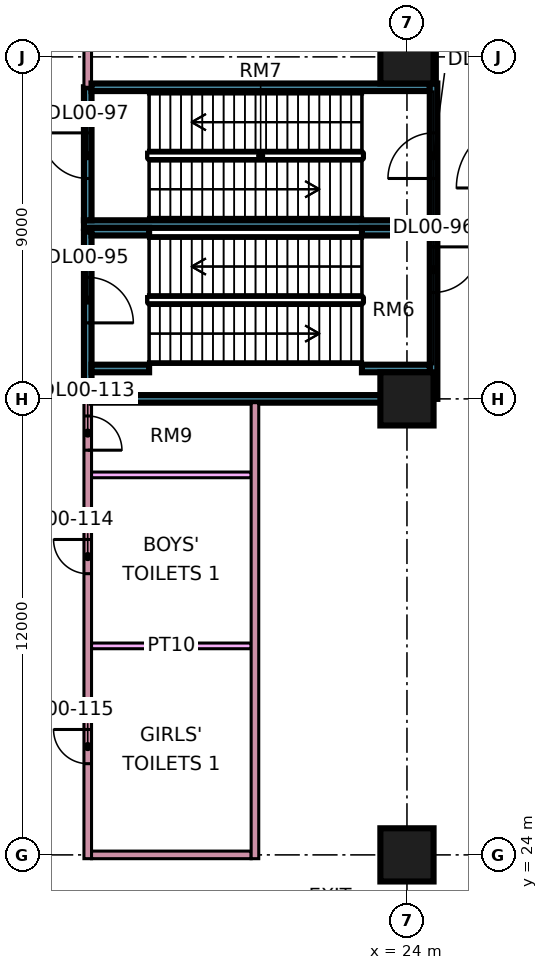
"""IFC4 building model, lengths in metres.
Left out: names, types, materials, properties, quantities, classifications, styles, units other than length and angle.
Written with IfcOpenShell. Run it as: python <this file> out.ifc"""

import sys

from ifc_helpers import new_model, si_unit, direction, frame, frame_2d, origin, origin_2d, place, context, subcontext, project, spatial, rectangle, extrude, element, fill, save


model = new_model("IFC4")
c1 = context("Model", 3, precision=1e-05, world=origin(), true_north=direction((0.0, 1.0)))
c2 = subcontext(c1, "Body", "Model", "MODEL_VIEW")
j1 = project(units=[si_unit("LENGTHUNIT", "METRE"), si_unit("PLANEANGLEUNIT", "RADIAN")], contexts=[c1])
p1 = place(None, origin())
s1 = spatial("IfcSite", under=j1, at=p1, CompositionType="ELEMENT")
p2 = place(p1, origin())
s2 = spatial("IfcBuilding", under=s1, at=p2, CompositionType="ELEMENT")
p3 = place(p2, origin())
s3 = spatial("IfcBuildingStorey", under=s2, at=p3, CompositionType="ELEMENT", Elevation=0.0)
for number, where, z_axis, x_axis in (
    (1, (24.0, 24.0, 0.0), (0.0, 0.0, 1.0), (1.0, 0.0, 0.0)),
    (2, (24.0, 36.0, 0.0), (0.0, 0.0, 1.0), (1.0, 0.0, 0.0)),
    (3, (24.0, 45.0, 0.0), (0.0, 0.0, 1.0), (1.0, 0.0, 0.0)),
):
    element("IfcColumn", number, at=place(p3, frame(where, z_axis=z_axis, x_axis=x_axis)), inside=s3, PredefinedType="COLUMN", context=c2, shape_type="SweptSolid", body=[
        extrude(rectangle(XDim=1.4, YDim=1.4, at=origin_2d()), origin(), (0.0, 0.0, 1.0), 7.2),
    ])
p4 = place(p3, frame((15.5, 40.6, 0.0), z_axis=(0.0, 0.0, 1.0), x_axis=(1.0, 0.0, 0.0)))
e4 = element("IfcWall", 4, at=p4, inside=s3, PredefinedType="SOLIDWALL", context=c2, shape_type="SweptSolid", body=[
    extrude(rectangle(XDim=9.3, YDim=0.2, at=frame_2d((4.65, 0.0))), origin(), (0.0, 0.0, 1.0), 6.8),
])
p5 = place(p3, frame((15.6, 23.9, 0.0), z_axis=(0.0, 0.0, 1.0), x_axis=(0.0, 1.0, 0.0)))
e5 = element("IfcWall", 5, at=p5, inside=s3, PredefinedType="PARTITIONING", context=c2, shape_type="SweptSolid", body=[
    extrude(rectangle(XDim=12.1, YDim=0.2, at=frame_2d((6.05, 0.0))), origin(), (0.0, 0.0, 1.0), 6.8),
])
p6 = place(p5, frame((10.75, 0.0, 0.0)))
e6 = element("IfcOpeningElement", 6, at=p6, cuts=e5, PredefinedType="OPENING", context=c2, shape_type="SweptSolid", body=[
    extrude(rectangle(XDim=0.9, YDim=2.1, at=frame_2d((0.45, 1.05))), frame((0.0, 0.11, 0.0), z_axis=(0.0, -1.0, 0.0), x_axis=(1.0, 0.0, 0.0)), (0.0, 0.0, 1.0), 0.22),
])
p7 = place(p5, frame((7.5, 0.0, 0.0)))
e7 = element("IfcOpeningElement", 7, at=p7, cuts=e5, PredefinedType="OPENING", context=c2, shape_type="SweptSolid", body=[
    extrude(rectangle(XDim=0.9, YDim=2.1, at=frame_2d((0.45, 1.05))), frame((0.0, 0.11, 0.0), z_axis=(0.0, -1.0, 0.0), x_axis=(1.0, 0.0, 0.0)), (0.0, 0.0, 1.0), 0.22),
])
p8 = place(p5, frame((2.5, 0.0, 0.0)))
e8 = element("IfcOpeningElement", 8, at=p8, cuts=e5, PredefinedType="OPENING", context=c2, shape_type="SweptSolid", body=[
    extrude(rectangle(XDim=0.9, YDim=2.1, at=frame_2d((0.45, 1.05))), frame((0.0, 0.11, 0.0), z_axis=(0.0, -1.0, 0.0), x_axis=(1.0, 0.0, 0.0)), (0.0, 0.0, 1.0), 0.22),
])
p9 = place(p3, frame((15.6, 36.0, 0.0), z_axis=(0.0, 0.0, 1.0), x_axis=(0.0, 1.0, 0.0)))
e9 = element("IfcWall", 9, at=p9, inside=s3, PredefinedType="SOLIDWALL", context=c2, shape_type="SweptSolid", body=[
    extrude(rectangle(XDim=4.4, YDim=0.2, at=frame_2d((2.2, 0.0))), origin(), (0.0, 0.0, 1.0), 6.8),
])
p10 = place(p9, frame((2.0, 0.0, 0.0)))
e10 = element("IfcOpeningElement", 10, at=p10, cuts=e9, PredefinedType="OPENING", context=c2, shape_type="SweptSolid", body=[
    extrude(rectangle(XDim=1.2, YDim=2.1, at=frame_2d((0.6, 1.05))), frame((0.0, 0.11, 0.0), z_axis=(0.0, -1.0, 0.0), x_axis=(1.0, 0.0, 0.0)), (0.0, 0.0, 1.0), 0.22),
])
p11 = place(p3, frame((15.6, 40.7, 0.0), z_axis=(0.0, 0.0, 1.0), x_axis=(0.0, 1.0, 0.0)))
e11 = element("IfcWall", 11, at=p11, inside=s3, PredefinedType="SOLIDWALL", context=c2, shape_type="SweptSolid", body=[
    extrude(rectangle(XDim=3.5, YDim=0.2, at=frame_2d((1.75, 0.0))), origin(), (0.0, 0.0, 1.0), 6.8),
])
p12 = place(p11, frame((1.1, 0.0, 0.0)))
e12 = element("IfcOpeningElement", 12, at=p12, cuts=e11, PredefinedType="OPENING", context=c2, shape_type="SweptSolid", body=[
    extrude(rectangle(XDim=1.2, YDim=2.1, at=frame_2d((0.6, 1.05))), frame((0.0, 0.11, 0.0), z_axis=(0.0, -1.0, 0.0), x_axis=(1.0, 0.0, 0.0)), (0.0, 0.0, 1.0), 0.22),
])
p13 = place(p3, frame((15.6, 44.2, 0.0), z_axis=(0.0, 0.0, 1.0), x_axis=(0.0, 1.0, 0.0)))
e13 = element("IfcWall", 13, at=p13, inside=s3, PredefinedType="PARTITIONING", context=c2, shape_type="SweptSolid", body=[
    extrude(rectangle(XDim=3.575, YDim=0.2, at=frame_2d((1.788, 0.0))), origin(), (0.0, 0.0, 1.0), 6.8),
])
p14 = place(p3, frame((15.7, 24.0, 0.0), z_axis=(0.0, 0.0, 1.0), x_axis=(1.0, 0.0, 0.0)))
e14 = element("IfcWall", 14, at=p14, inside=s3, PredefinedType="PARTITIONING", context=c2, shape_type="SweptSolid", body=[
    extrude(rectangle(XDim=4.2, YDim=0.2, at=frame_2d((2.1, 0.0))), origin(), (0.0, 0.0, 1.0), 6.8),
])
for number, where, z_axis, x_axis in (
    (15, (15.7, 29.5, 0.0), (0.0, 0.0, 1.0), (1.0, 0.0, 0.0)),
    (16, (15.7, 34.0, 0.0), (0.0, 0.0, 1.0), (1.0, 0.0, 0.0)),
):
    element("IfcWall", number, at=place(p3, frame(where, z_axis=z_axis, x_axis=x_axis)), inside=s3, PredefinedType="PARTITIONING", context=c2, shape_type="SweptSolid", body=[
        extrude(rectangle(XDim=4.2, YDim=0.15, at=frame_2d((2.1, 0.0))), origin(), (0.0, 0.0, 1.0), 6.8),
    ])
p15 = place(p3, frame((15.7, 36.0, 0.0), z_axis=(0.0, 0.0, 1.0), x_axis=(1.0, 0.0, 0.0)))
e17 = element("IfcWall", 17, at=p15, inside=s3, PredefinedType="SOLIDWALL", context=c2, shape_type="SweptSolid", body=[
    extrude(rectangle(XDim=8.3, YDim=0.2, at=frame_2d((4.15, 0.0))), origin(), (0.0, 0.0, 1.0), 6.8),
])
p16 = place(p3, frame((15.7, 44.2, 0.0), z_axis=(0.0, 0.0, 1.0), x_axis=(1.0, 0.0, 0.0)))
e18 = element("IfcWall", 18, at=p16, inside=s3, PredefinedType="SOLIDWALL", context=c2, shape_type="SweptSolid", body=[
    extrude(rectangle(XDim=8.9, YDim=0.2, at=frame_2d((4.45, 0.0))), origin(), (0.0, 0.0, 1.0), 6.8),
])
p17 = place(p3, frame((20.0, 23.9, 0.0), z_axis=(0.0, 0.0, 1.0), x_axis=(0.0, 1.0, 0.0)))
e19 = element("IfcWall", 19, at=p17, inside=s3, PredefinedType="PARTITIONING", context=c2, shape_type="SweptSolid", body=[
    extrude(rectangle(XDim=12.0, YDim=0.2, at=frame_2d((6.0, 0.0))), origin(), (0.0, 0.0, 1.0), 6.8),
])
p18 = place(p3, frame((24.7, 36.0, 0.0), z_axis=(0.0, 0.0, 1.0), x_axis=(0.0, 1.0, 0.0)))
e20 = element("IfcWall", 20, at=p18, inside=s3, PredefinedType="SOLIDWALL", context=c2, shape_type="SweptSolid", body=[
    extrude(rectangle(XDim=4.4, YDim=0.2, at=frame_2d((2.2, 0.0))), origin(), (0.0, 0.0, 1.0), 6.8),
])
p19 = place(p18, frame((2.8, 0.0, 0.0)))
e21 = element("IfcOpeningElement", 21, at=p19, cuts=e20, PredefinedType="OPENING", context=c2, shape_type="SweptSolid", body=[
    extrude(rectangle(XDim=1.2, YDim=2.1, at=frame_2d((0.6, 1.05))), frame((0.0, 0.11, 0.0), z_axis=(0.0, -1.0, 0.0), x_axis=(1.0, 0.0, 0.0)), (0.0, 0.0, 1.0), 0.22),
])
p20 = place(p3, frame((24.7, 40.7, 0.0), z_axis=(0.0, 0.0, 1.0), x_axis=(0.0, 1.0, 0.0)))
e22 = element("IfcWall", 22, at=p20, inside=s3, PredefinedType="SOLIDWALL", context=c2, shape_type="SweptSolid", body=[
    extrude(rectangle(XDim=3.6, YDim=0.2, at=frame_2d((1.8, 0.0))), origin(), (0.0, 0.0, 1.0), 6.8),
])
p21 = place(p20, frame((1.1, 0.0, 0.0)))
e23 = element("IfcOpeningElement", 23, at=p21, cuts=e22, PredefinedType="OPENING", context=c2, shape_type="SweptSolid", body=[
    extrude(rectangle(XDim=1.2, YDim=2.1, at=frame_2d((0.6, 1.05))), frame((0.0, 0.11, 0.0), z_axis=(0.0, -1.0, 0.0), x_axis=(1.0, 0.0, 0.0)), (0.0, 0.0, 1.0), 0.22),
])
p22 = place(p3, frame((24.7, 44.3, 0.0), z_axis=(0.0, 0.0, 1.0), x_axis=(0.0, 1.0, 0.0)))
e24 = element("IfcWall", 24, at=p22, inside=s3, PredefinedType="PARTITIONING", context=c2, shape_type="SweptSolid", body=[
    extrude(rectangle(XDim=19.5, YDim=0.2, at=frame_2d((9.75, 0.0))), origin(), (0.0, 0.0, 1.0), 6.8),
])
p23 = place(p22, frame((1.45, 0.0, 0.0)))
e25 = element("IfcOpeningElement", 25, at=p23, cuts=e24, PredefinedType="OPENING", context=c2, shape_type="SweptSolid", body=[
    extrude(rectangle(XDim=1.0, YDim=2.1, at=frame_2d((0.5, 1.05))), frame((0.0, 0.11, 0.0), z_axis=(0.0, -1.0, 0.0), x_axis=(1.0, 0.0, 0.0)), (0.0, 0.0, 1.0), 0.22),
])
p24 = place(p22, frame((6.65, 0.0, 0.0)))
e26 = element("IfcOpeningElement", 26, at=p24, cuts=e24, PredefinedType="OPENING", context=c2, shape_type="SweptSolid", body=[
    extrude(rectangle(XDim=1.0, YDim=2.1, at=frame_2d((0.5, 1.05))), frame((0.0, 0.11, 0.0), z_axis=(0.0, -1.0, 0.0), x_axis=(1.0, 0.0, 0.0)), (0.0, 0.0, 1.0), 0.22),
])
for number, where, z_axis, x_axis in (
    (27, (22.815, 36.8, 0.0), (0.0, 0.0, 1.0), (1.0, 0.0, 0.0)),
    (28, (22.815, 40.4, 0.0), (0.0, 0.0, 1.0), (1.0, 0.0, 0.0)),
):
    element("IfcWall", number, at=place(p3, frame(where, z_axis=z_axis, x_axis=x_axis)), inside=s3, PredefinedType="SOLIDWALL", context=c2, shape_type="SweptSolid", body=[
        extrude(rectangle(XDim=1.785, YDim=0.2, at=frame_2d((0.893, 0.0))), origin(), (0.0, 0.0, 1.0), 6.8),
    ])
for number, where, z_axis, x_axis in (
    (29, (15.7, 36.8, 0.0), (0.0, 0.0, 1.0), (1.0, 0.0, 0.0)),
    (30, (15.7, 40.4, 0.0), (0.0, 0.0, 1.0), (1.0, 0.0, 0.0)),
):
    element("IfcWall", number, at=place(p3, frame(where, z_axis=z_axis, x_axis=x_axis)), inside=s3, PredefinedType="SOLIDWALL", context=c2, shape_type="SweptSolid", body=[
        extrude(rectangle(XDim=1.515, YDim=0.2, at=frame_2d((0.758, 0.0))), origin(), (0.0, 0.0, 1.0), 6.8),
    ])
p25 = place(p10, frame((1.2, 0.0, 0.0), z_axis=(0.0, 0.0, 1.0), x_axis=(-1.0, 0.0, 0.0)))
e31 = element("IfcDoor", 31, at=p25, inside=s3, OperationType="SINGLE_SWING_LEFT", PredefinedType="DOOR", context=c2, shape_type="SweptSolid", body=[
    extrude(rectangle(XDim=1.2, YDim=2.1, at=frame_2d((0.6, 1.05))), frame((0.0, 0.025, 0.0), z_axis=(0.0, -1.0, 0.0), x_axis=(1.0, 0.0, 0.0)), (0.0, 0.0, 1.0), 0.05),
])
fill(e10, e31)
p26 = place(p19, origin())
e32 = element("IfcDoor", 32, at=p26, inside=s3, OperationType="SINGLE_SWING_RIGHT", PredefinedType="DOOR", context=c2, shape_type="SweptSolid", body=[
    extrude(rectangle(XDim=1.2, YDim=2.1, at=frame_2d((0.6, 1.05))), frame((0.0, 0.025, 0.0), z_axis=(0.0, -1.0, 0.0), x_axis=(1.0, 0.0, 0.0)), (0.0, 0.0, 1.0), 0.05),
])
fill(e21, e32)
p27 = place(p12, frame((1.2, 0.0, 0.0), z_axis=(0.0, 0.0, 1.0), x_axis=(-1.0, 0.0, 0.0)))
e33 = element("IfcDoor", 33, at=p27, inside=s3, OperationType="SINGLE_SWING_RIGHT", PredefinedType="DOOR", context=c2, shape_type="SweptSolid", body=[
    extrude(rectangle(XDim=1.2, YDim=2.1, at=frame_2d((0.6, 1.05))), frame((0.0, 0.025, 0.0), z_axis=(0.0, -1.0, 0.0), x_axis=(1.0, 0.0, 0.0)), (0.0, 0.0, 1.0), 0.05),
])
fill(e12, e33)
p28 = place(p21, origin())
e34 = element("IfcDoor", 34, at=p28, inside=s3, OperationType="SINGLE_SWING_LEFT", PredefinedType="DOOR", context=c2, shape_type="SweptSolid", body=[
    extrude(rectangle(XDim=1.2, YDim=2.1, at=frame_2d((0.6, 1.05))), frame((0.0, 0.025, 0.0), z_axis=(0.0, -1.0, 0.0), x_axis=(1.0, 0.0, 0.0)), (0.0, 0.0, 1.0), 0.05),
])
fill(e23, e34)
p29 = place(p6, frame((0.9, 0.0, 0.0), z_axis=(0.0, 0.0, 1.0), x_axis=(-1.0, 0.0, 0.0)))
e35 = element("IfcDoor", 35, at=p29, inside=s3, OperationType="SINGLE_SWING_LEFT", PredefinedType="DOOR", context=c2, shape_type="SweptSolid", body=[
    extrude(rectangle(XDim=0.9, YDim=2.1, at=frame_2d((0.45, 1.05))), frame((0.0, 0.025, 0.0), z_axis=(0.0, -1.0, 0.0), x_axis=(1.0, 0.0, 0.0)), (0.0, 0.0, 1.0), 0.05),
])
fill(e6, e35)
p30 = place(p7, frame((0.9, 0.0, 0.0), z_axis=(0.0, 0.0, 1.0), x_axis=(-1.0, 0.0, 0.0)))
e36 = element("IfcDoor", 36, at=p30, inside=s3, OperationType="SINGLE_SWING_RIGHT", PredefinedType="DOOR", context=c2, shape_type="SweptSolid", body=[
    extrude(rectangle(XDim=0.9, YDim=2.1, at=frame_2d((0.45, 1.05))), frame((0.0, 0.025, 0.0), z_axis=(0.0, -1.0, 0.0), x_axis=(1.0, 0.0, 0.0)), (0.0, 0.0, 1.0), 0.05),
])
fill(e7, e36)
p31 = place(p8, frame((0.9, 0.0, 0.0), z_axis=(0.0, 0.0, 1.0), x_axis=(-1.0, 0.0, 0.0)))
e37 = element("IfcDoor", 37, at=p31, inside=s3, OperationType="SINGLE_SWING_RIGHT", PredefinedType="DOOR", context=c2, shape_type="SweptSolid", body=[
    extrude(rectangle(XDim=0.9, YDim=2.1, at=frame_2d((0.45, 1.05))), frame((0.0, 0.025, 0.0), z_axis=(0.0, -1.0, 0.0), x_axis=(1.0, 0.0, 0.0)), (0.0, 0.0, 1.0), 0.05),
])
fill(e8, e37)
save(model, sys.argv[1])
